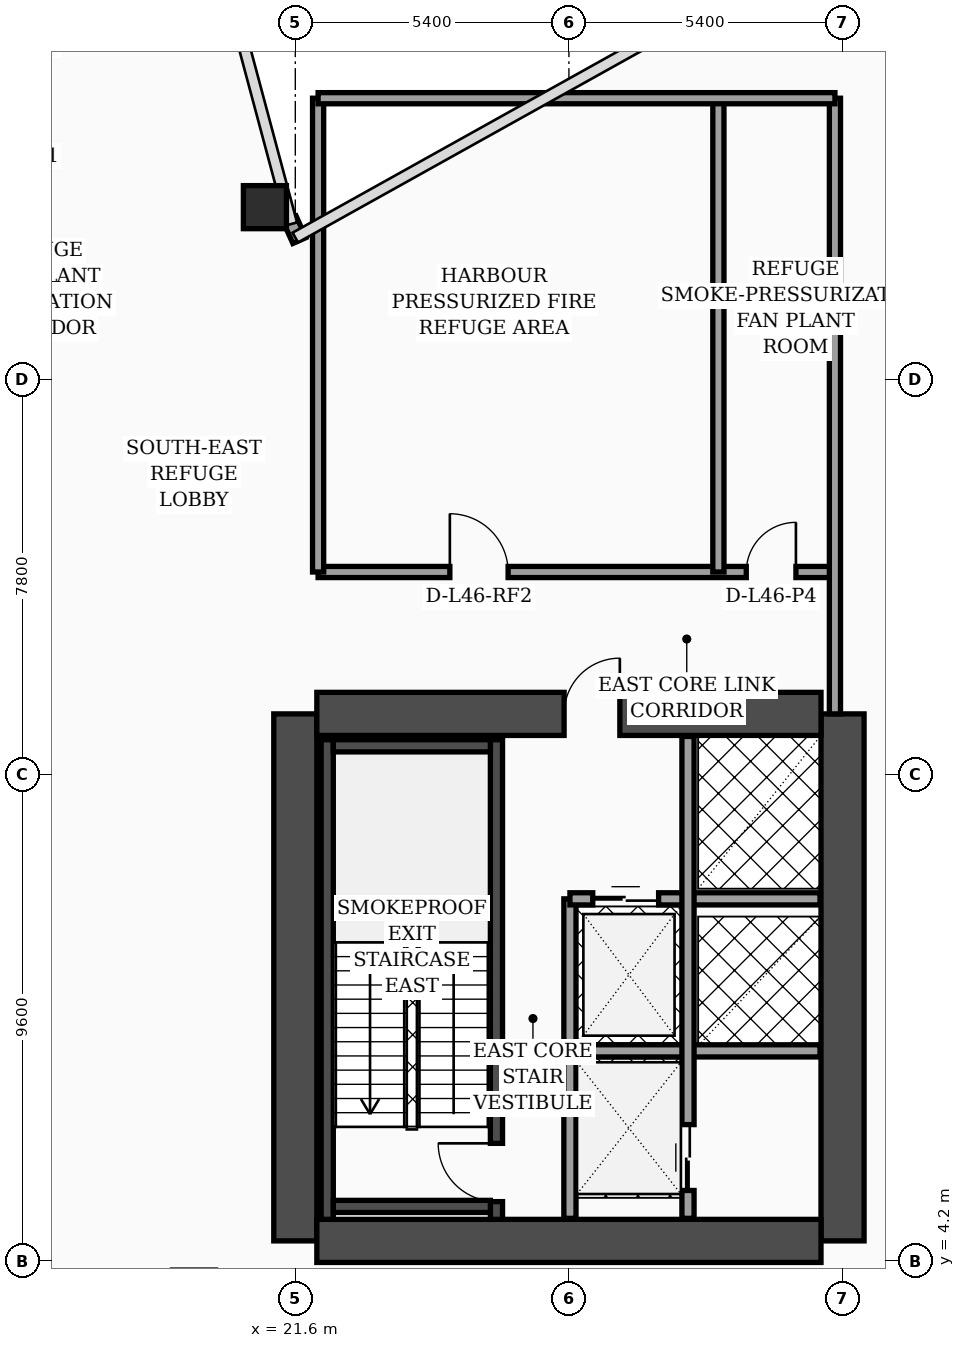
"""IFC4 building model, lengths in metres.
Left out: names, types, materials, properties, quantities, classifications, styles, units other than length and angle.
Written with IfcOpenShell. Run it as: python <this file> out.ifc"""

import sys

from ifc_helpers import new_model, si_unit, direction, frame, frame_2d, origin, origin_2d, place, context, subcontext, project, spatial, rectangle, hollow_rectangle, extrude, element, fill, save


model = new_model("IFC4")
c1 = context("Model", 3, precision=1e-05, world=origin(), true_north=direction((0.0, 1.0)))
c2 = subcontext(c1, "Body", "Model", "MODEL_VIEW")
j1 = project(units=[si_unit("LENGTHUNIT", "METRE"), si_unit("PLANEANGLEUNIT", "RADIAN")], contexts=[c1])
p1 = place(None, origin())
s1 = spatial("IfcSite", under=j1, at=p1, CompositionType="ELEMENT")
p2 = place(p1, origin())
s2 = spatial("IfcBuilding", under=s1, at=p2, CompositionType="ELEMENT")
p3 = place(p2, frame((0.0, 0.0, 186.5)))
s3 = spatial("IfcBuildingStorey", under=s2, at=p3, CompositionType="ELEMENT", Elevation=186.5)
for number, where, z_axis, x_axis in (
    (1, (21.6, 4.6, 0.0), (0.0, 0.0, 1.0), (0.0, 1.0, 0.0)),
    (2, (32.4, 4.6, 0.0), (0.0, 0.0, 1.0), (0.0, 1.0, 0.0)),
):
    element("IfcWall", number, at=place(p3, frame(where, z_axis=z_axis, x_axis=x_axis)), inside=s3, PredefinedType="SHEAR", context=c2, shape_type="SweptSolid", body=[
        extrude(rectangle(XDim=10.4, YDim=0.85, at=frame_2d((5.2, 0.0))), origin(), (0.0, 0.0, 1.0), 4.35),
    ])
p4 = place(p3, frame((22.025, 15.0, 0.0), z_axis=(0.0, 0.0, 1.0), x_axis=(1.0, 0.0, 0.0)))
e3 = element("IfcWall", 3, at=p4, inside=s3, PredefinedType="SHEAR", context=c2, shape_type="SweptSolid", body=[
    extrude(rectangle(XDim=9.95, YDim=0.85, at=frame_2d((4.975, 0.0))), origin(), (0.0, 0.0, 1.0), 4.35),
])
p5 = place(p4, frame((4.88, 0.0, 0.0)))
e4 = element("IfcOpeningElement", 4, at=p5, cuts=e3, PredefinedType="OPENING", context=c2, shape_type="SweptSolid", body=[
    extrude(rectangle(XDim=1.1, YDim=2.2, at=frame_2d((0.55, 1.1))), frame((0.0, 0.435, 0.0), z_axis=(0.0, -1.0, 0.0), x_axis=(1.0, 0.0, 0.0)), (0.0, 0.0, 1.0), 0.87),
])
p6 = place(p3, frame((22.025, 4.6, 0.0), z_axis=(0.0, 0.0, 1.0), x_axis=(1.0, 0.0, 0.0)))
e5 = element("IfcWall", 5, at=p6, inside=s3, PredefinedType="SHEAR", context=c2, shape_type="SweptSolid", body=[
    extrude(rectangle(XDim=9.95, YDim=0.85, at=frame_2d((4.975, 0.0))), origin(), (0.0, 0.0, 1.0), 4.35),
])
p7 = place(p3, frame((22.23, 5.025, 0.0), z_axis=(0.0, 0.0, 1.0), x_axis=(0.0, 1.0, 0.0)))
e6 = element("IfcWall", 6, at=p7, inside=s3, PredefinedType="SOLIDWALL", context=c2, shape_type="SweptSolid", body=[
    extrude(rectangle(XDim=9.465, YDim=0.24, at=frame_2d((4.732, 0.0))), origin(), (0.0, 0.0, 1.0), 4.35),
])
p8 = place(p3, frame((25.57, 5.025, 0.0), z_axis=(0.0, 0.0, 1.0), x_axis=(0.0, 1.0, 0.0)))
e7 = element("IfcWall", 7, at=p8, inside=s3, PredefinedType="SOLIDWALL", context=c2, shape_type="SweptSolid", body=[
    extrude(rectangle(XDim=9.465, YDim=0.24, at=frame_2d((4.732, 0.0))), origin(), (0.0, 0.0, 1.0), 4.35),
])
p9 = place(p8, frame((0.35, 0.0, 0.0)))
e8 = element("IfcOpeningElement", 8, at=p9, cuts=e7, PredefinedType="OPENING", context=c2, shape_type="SweptSolid", body=[
    extrude(rectangle(XDim=1.15, YDim=2.2, at=frame_2d((0.575, 1.1))), frame((0.0, 0.13, 0.0), z_axis=(0.0, -1.0, 0.0), x_axis=(1.0, 0.0, 0.0)), (0.0, 0.0, 1.0), 0.26),
])
for number, where, z_axis, x_axis in (
    (9, (22.35, 5.28, 0.0), (0.0, 0.0, 1.0), (1.0, 0.0, 0.0)),
    (10, (22.35, 14.37, 0.0), (0.0, 0.0, 1.0), (1.0, 0.0, 0.0)),
):
    element("IfcWall", number, at=place(p3, frame(where, z_axis=z_axis, x_axis=x_axis)), inside=s3, PredefinedType="SOLIDWALL", context=c2, shape_type="SweptSolid", body=[
        extrude(rectangle(XDim=3.1, YDim=0.24, at=frame_2d((1.55, 0.0))), origin(), (0.0, 0.0, 1.0), 4.35),
    ])
p10 = place(p3, frame((21.0, 25.0, 0.0), z_axis=(0.0, 0.0, 1.0), x_axis=(1.0, 0.0, 0.0)))
e11 = element("IfcColumn", 11, at=p10, inside=s3, PredefinedType="COLUMN", context=c2, shape_type="SweptSolid", body=[
    extrude(hollow_rectangle(XDim=0.85, YDim=0.85, WallThickness=0.036, at=origin_2d()), origin(), (0.0, 0.0, 1.0), 4.35),
])
p11 = place(p3, frame((21.68, 24.34, 0.0), z_axis=(0.0, 0.0, 1.0), x_axis=(-0.40758134973, 0.913168901875, 0.0)))
e12 = element("IfcWall", 12, at=p11, inside=s3, PredefinedType="SOLIDWALL", context=c2, shape_type="SweptSolid", body=[
    extrude(rectangle(XDim=0.471, YDim=0.28, at=frame_2d((0.235, 0.0))), origin(), (0.0, 0.0, 1.0), 4.35),
])
p12 = place(p3, frame((27.02, 5.045, 0.0), z_axis=(0.0, 0.0, 1.0), x_axis=(0.0, 1.0, 0.0)))
e13 = element("IfcWall", 13, at=p12, inside=s3, PredefinedType="SOLIDWALL", context=c2, shape_type="SweptSolid", body=[
    extrude(rectangle(XDim=6.305, YDim=0.24, at=frame_2d((3.153, 0.0))), origin(), (0.0, 0.0, 1.0), 4.35),
])
p13 = place(p3, frame((27.02, 11.35, 0.0), z_axis=(0.0, 0.0, 1.0), x_axis=(1.0, 0.0, 0.0)))
e14 = element("IfcWall", 14, at=p13, inside=s3, PredefinedType="SOLIDWALL", context=c2, shape_type="SweptSolid", body=[
    extrude(rectangle(XDim=4.935, YDim=0.24, at=frame_2d((2.468, 0.0))), origin(), (0.0, 0.0, 1.0), 4.35),
])
p14 = place(p13, frame((0.45, 0.0, 0.0)))
e15 = element("IfcOpeningElement", 15, at=p14, cuts=e14, PredefinedType="OPENING", context=c2, shape_type="SweptSolid", body=[
    extrude(rectangle(XDim=1.3, YDim=2.35, at=frame_2d((0.65, 1.175))), frame((0.0, 0.13, 0.0), z_axis=(0.0, -1.0, 0.0), x_axis=(1.0, 0.0, 0.0)), (0.0, 0.0, 1.0), 0.26),
])
p15 = place(p3, frame((27.02, 8.35, 0.0), z_axis=(0.0, 0.0, 1.0), x_axis=(1.0, 0.0, 0.0)))
e16 = element("IfcWall", 16, at=p15, inside=s3, PredefinedType="SOLIDWALL", context=c2, shape_type="SweptSolid", body=[
    extrude(rectangle(XDim=4.935, YDim=0.24, at=frame_2d((2.468, 0.0))), origin(), (0.0, 0.0, 1.0), 4.35),
])
p16 = place(p3, frame((29.35, 5.045, 0.0), z_axis=(0.0, 0.0, 1.0), x_axis=(0.0, 1.0, 0.0)))
e17 = element("IfcWall", 17, at=p16, inside=s3, PredefinedType="SOLIDWALL", context=c2, shape_type="SweptSolid", body=[
    extrude(rectangle(XDim=9.51, YDim=0.24, at=frame_2d((4.755, 0.0))), origin(), (0.0, 0.0, 1.0), 4.35),
])
p17 = place(p16, frame((0.55, 0.0, 0.0)))
e18 = element("IfcOpeningElement", 18, at=p17, cuts=e17, PredefinedType="OPENING", context=c2, shape_type="SweptSolid", body=[
    extrude(rectangle(XDim=1.3, YDim=2.35, at=frame_2d((0.65, 1.175))), frame((0.0, 0.13, 0.0), z_axis=(0.0, -1.0, 0.0), x_axis=(1.0, 0.0, 0.0)), (0.0, 0.0, 1.0), 0.26),
])
p18 = place(p3, frame((22.05, 17.8, 0.0), z_axis=(0.0, 0.0, 1.0), x_axis=(1.0, 0.0, 0.0)))
e19 = element("IfcWall", 19, at=p18, inside=s3, PredefinedType="SOLIDWALL", context=c2, shape_type="SweptSolid", body=[
    extrude(rectangle(XDim=10.2, YDim=0.22, at=frame_2d((5.1, 0.0))), origin(), (0.0, 0.0, 1.0), 2.65),
])
p19 = place(p18, frame((2.6, 0.0, 0.0)))
e20 = element("IfcOpeningElement", 20, at=p19, cuts=e19, PredefinedType="OPENING", context=c2, shape_type="SweptSolid", body=[
    extrude(rectangle(XDim=1.15, YDim=2.2, at=frame_2d((0.575, 1.1))), frame((0.0, 0.12, 0.0), z_axis=(0.0, -1.0, 0.0), x_axis=(1.0, 0.0, 0.0)), (0.0, 0.0, 1.0), 0.24),
])
p20 = place(p18, frame((8.45, 0.0, 0.0)))
e21 = element("IfcOpeningElement", 21, at=p20, cuts=e19, PredefinedType="OPENING", context=c2, shape_type="SweptSolid", body=[
    extrude(rectangle(XDim=0.98, YDim=2.15, at=frame_2d((0.49, 1.075))), frame((0.0, 0.12, 0.0), z_axis=(0.0, -1.0, 0.0), x_axis=(1.0, 0.0, 0.0)), (0.0, 0.0, 1.0), 0.24),
])
for number, where, z_axis, x_axis in (
    (22, (29.95, 17.8, 0.0), (0.0, 0.0, 1.0), (0.0, 1.0, 0.0)),
    (23, (22.05, 17.8, 0.0), (0.0, 0.0, 1.0), (0.0, 1.0, 0.0)),
):
    element("IfcWall", number, at=place(p3, frame(where, z_axis=z_axis, x_axis=x_axis)), inside=s3, PredefinedType="SOLIDWALL", context=c2, shape_type="SweptSolid", body=[
        extrude(rectangle(XDim=9.35, YDim=0.22, at=frame_2d((4.675, 0.0))), origin(), (0.0, 0.0, 1.0), 2.65),
    ])
p21 = place(p3, frame((32.25, 15.0, 0.0), z_axis=(0.0, 0.0, 1.0), x_axis=(0.0, 1.0, 0.0)))
e24 = element("IfcWall", 24, at=p21, inside=s3, PredefinedType="SOLIDWALL", context=c2, shape_type="SweptSolid", body=[
    extrude(rectangle(XDim=12.15, YDim=0.22, at=frame_2d((6.075, 0.0))), origin(), (0.0, 0.0, 1.0), 2.65),
])
p22 = place(p3, frame((22.05, 27.15, 0.0), z_axis=(0.0, 0.0, 1.0), x_axis=(1.0, 0.0, 0.0)))
e25 = element("IfcWall", 25, at=p22, inside=s3, PredefinedType="SOLIDWALL", context=c2, shape_type="SweptSolid", body=[
    extrude(rectangle(XDim=10.2, YDim=0.22, at=frame_2d((5.1, 0.0))), origin(), (0.0, 0.0, 1.0), 2.65),
])
p23 = place(p14, origin())
e26 = element("IfcDoor", 26, at=p23, inside=s3, OperationType="DOUBLE_DOOR_SLIDING", PredefinedType="DOOR", context=c2, shape_type="SweptSolid", body=[
    extrude(rectangle(XDim=1.3, YDim=2.35, at=frame_2d((0.65, 1.175))), frame((0.0, 0.025, 0.0), z_axis=(0.0, -1.0, 0.0), x_axis=(1.0, 0.0, 0.0)), (0.0, 0.0, 1.0), 0.05),
])
fill(e15, e26)
p24 = place(p17, origin())
e27 = element("IfcDoor", 27, at=p24, inside=s3, OperationType="DOUBLE_DOOR_SLIDING", PredefinedType="DOOR", context=c2, shape_type="SweptSolid", body=[
    extrude(rectangle(XDim=1.3, YDim=2.35, at=frame_2d((0.65, 1.175))), frame((0.0, 0.025, 0.0), z_axis=(0.0, -1.0, 0.0), x_axis=(1.0, 0.0, 0.0)), (0.0, 0.0, 1.0), 0.05),
])
fill(e18, e27)
p25 = place(p19, origin())
e28 = element("IfcDoor", 28, at=p25, inside=s3, OperationType="SINGLE_SWING_LEFT", PredefinedType="DOOR", context=c2, shape_type="SweptSolid", body=[
    extrude(rectangle(XDim=1.15, YDim=2.2, at=frame_2d((0.575, 1.1))), frame((0.0, 0.025, 0.0), z_axis=(0.0, -1.0, 0.0), x_axis=(1.0, 0.0, 0.0)), (0.0, 0.0, 1.0), 0.05),
])
fill(e20, e28)
p26 = place(p20, origin())
e29 = element("IfcDoor", 29, at=p26, inside=s3, OperationType="SINGLE_SWING_RIGHT", PredefinedType="DOOR", context=c2, shape_type="SweptSolid", body=[
    extrude(rectangle(XDim=0.98, YDim=2.15, at=frame_2d((0.49, 1.075))), frame((0.0, 0.025, 0.0), z_axis=(0.0, -1.0, 0.0), x_axis=(1.0, 0.0, 0.0)), (0.0, 0.0, 1.0), 0.05),
])
fill(e21, e29)
p27 = place(p9, origin())
e30 = element("IfcDoor", 30, at=p27, inside=s3, OperationType="SINGLE_SWING_RIGHT", PredefinedType="DOOR", context=c2, shape_type="SweptSolid", body=[
    extrude(rectangle(XDim=1.15, YDim=2.2, at=frame_2d((0.575, 1.1))), frame((0.0, 0.025, 0.0), z_axis=(0.0, -1.0, 0.0), x_axis=(1.0, 0.0, 0.0)), (0.0, 0.0, 1.0), 0.05),
])
fill(e8, e30)
p28 = place(p5, origin())
e31 = element("IfcDoor", 31, at=p28, inside=s3, OperationType="SINGLE_SWING_RIGHT", PredefinedType="DOOR", context=c2, shape_type="SweptSolid", body=[
    extrude(rectangle(XDim=1.1, YDim=2.2, at=frame_2d((0.55, 1.1))), frame((0.0, 0.025, 0.0), z_axis=(0.0, -1.0, 0.0), x_axis=(1.0, 0.0, 0.0)), (0.0, 0.0, 1.0), 0.05),
])
fill(e4, e31)
save(model, sys.argv[1])
